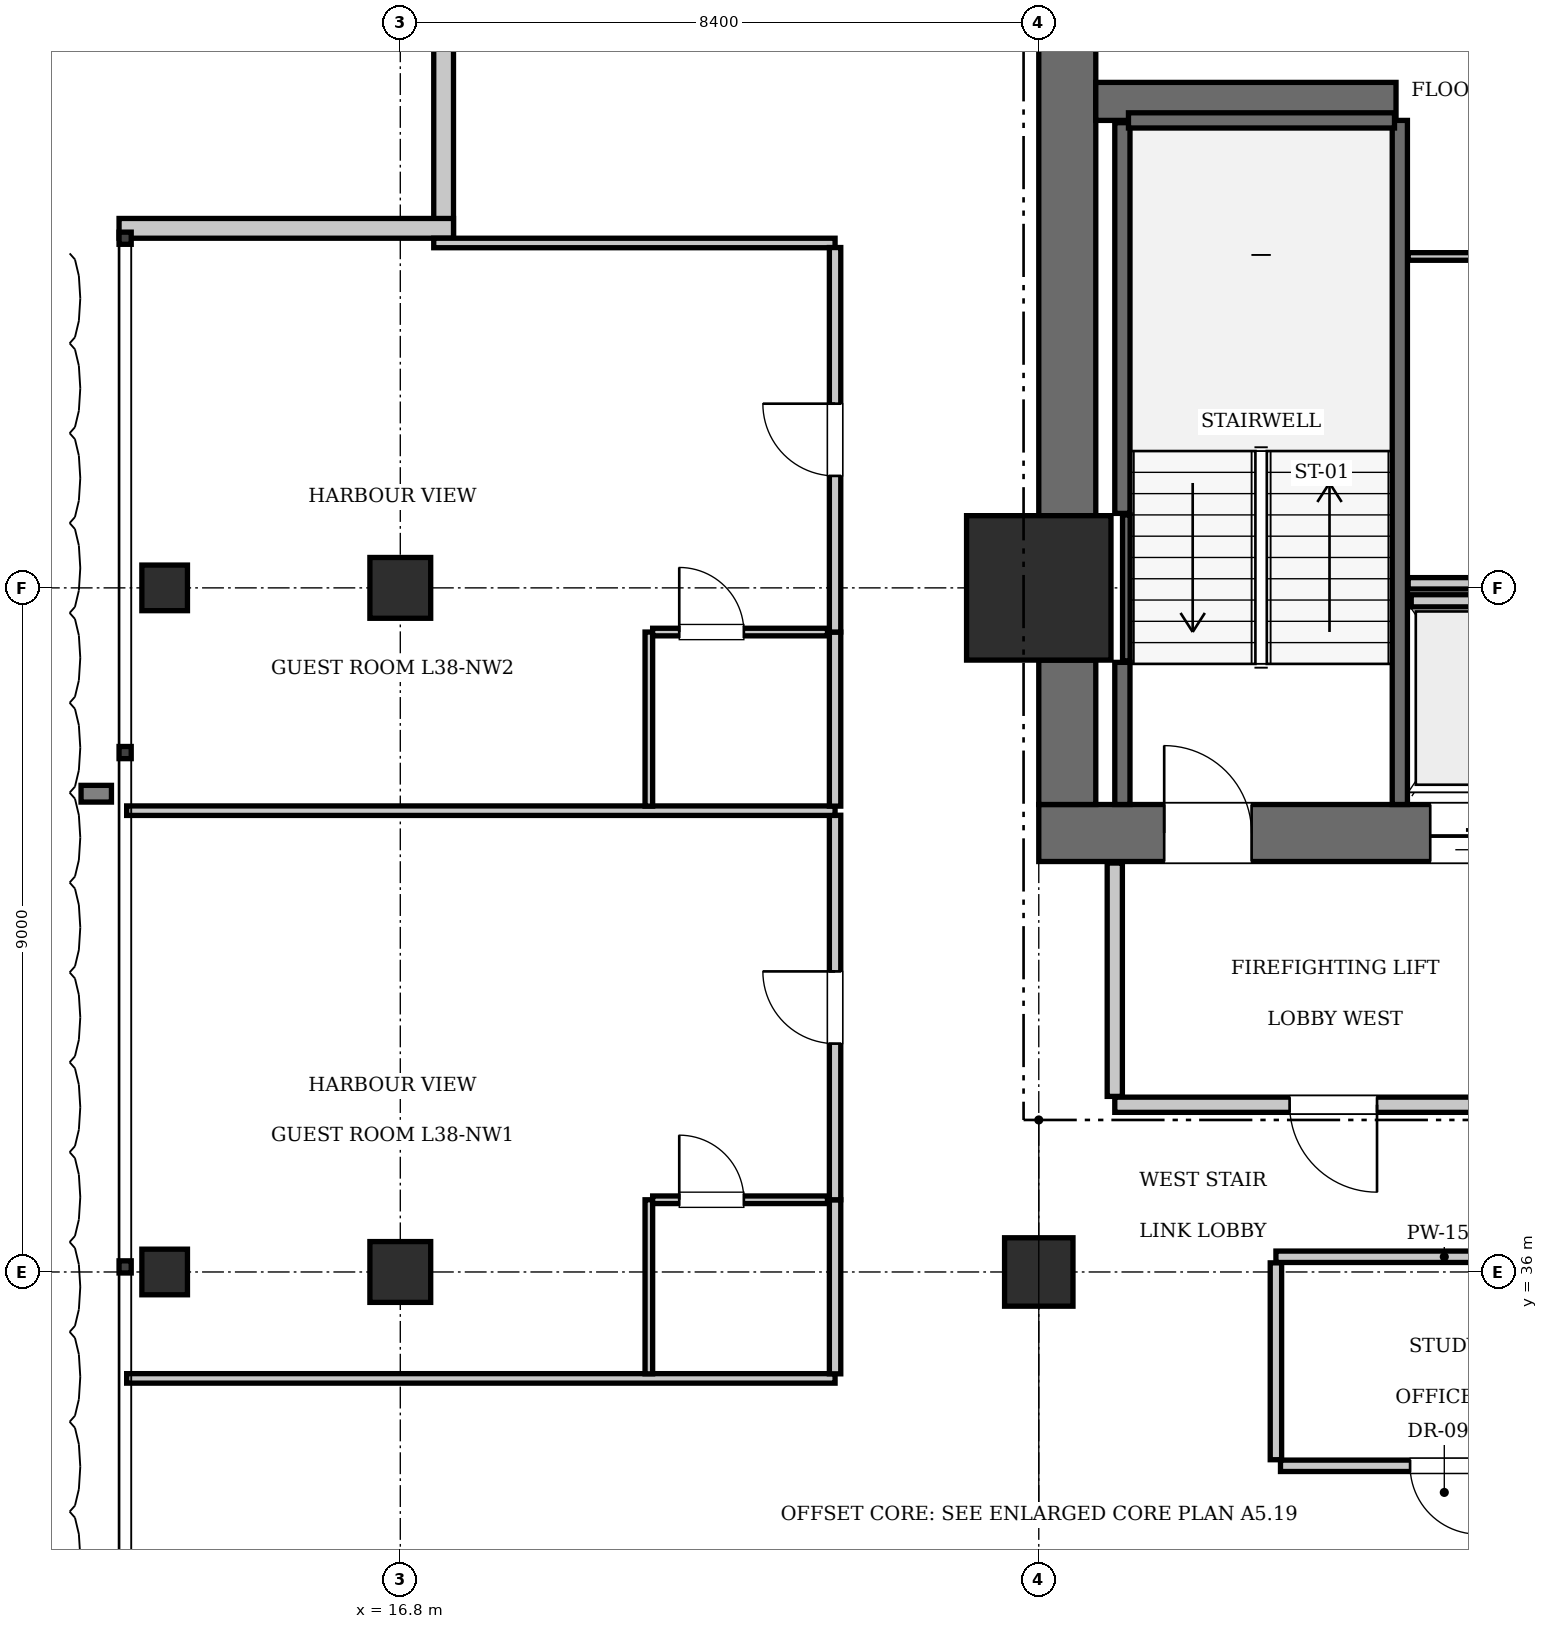
"""IFC4 building model, lengths in metres.
Left out: names, types, materials, properties, quantities, classifications, styles, units other than length and angle.
Written with IfcOpenShell. Run it as: python <this file> out.ifc"""

import sys

from ifc_helpers import new_model, si_unit, direction, frame, frame_2d, origin, origin_2d, place, context, subcontext, project, spatial, rectangle, i_section, extrude, element, fill, save


model = new_model("IFC4")
c1 = context("Model", 3, precision=1e-05, world=origin(), true_north=direction((0.0, 1.0)))
c2 = subcontext(c1, "Body", "Model", "MODEL_VIEW")
j1 = project(units=[si_unit("LENGTHUNIT", "METRE"), si_unit("PLANEANGLEUNIT", "RADIAN")], contexts=[c1])
p1 = place(None, origin())
s1 = spatial("IfcSite", under=j1, at=p1, CompositionType="ELEMENT")
p2 = place(p1, origin())
s2 = spatial("IfcBuilding", under=s1, at=p2, CompositionType="ELEMENT")
p3 = place(p2, frame((0.0, 0.0, 158.2)))
s3 = spatial("IfcBuildingStorey", under=s2, at=p3, CompositionType="ELEMENT", Elevation=158.2)
p4 = place(p3, frame((25.2, 45.0, 0.0), z_axis=(0.0, 0.0, 1.0), x_axis=(1.0, 0.0, 0.0)))
e1 = element("IfcColumn", 1, at=p4, inside=s3, PredefinedType="COLUMN", context=c2, shape_type="SweptSolid", body=[
    extrude(rectangle(XDim=1.9, YDim=1.9, at=origin_2d()), origin(), (0.0, 0.0, 1.0), 3.85),
])
p5 = place(p3, frame((25.2, 41.775, 0.0), z_axis=(0.0, 0.0, 1.0), x_axis=(1.0, 0.0, 0.0)))
e2 = element("IfcWall", 2, at=p5, inside=s3, PredefinedType="SHEAR", context=c2, shape_type="SweptSolid", body=[
    extrude(rectangle(XDim=6.8, YDim=0.75, at=frame_2d((3.4, 0.0))), origin(), (0.0, 0.0, 1.0), 3.85),
])
p6 = place(p5, frame((1.65, 0.0, 0.0)))
e3 = element("IfcOpeningElement", 3, at=p6, cuts=e2, PredefinedType="OPENING", context=c2, shape_type="SweptSolid", body=[
    extrude(rectangle(XDim=1.15, YDim=2.15, at=frame_2d((0.575, 1.075))), frame((0.0, 0.385, 0.0), z_axis=(0.0, -1.0, 0.0), x_axis=(1.0, 0.0, 0.0)), (0.0, 0.0, 1.0), 0.77),
])
p7 = place(p5, frame((5.15, 0.0, 0.0)))
e4 = element("IfcOpeningElement", 4, at=p7, cuts=e2, PredefinedType="OPENING", context=c2, shape_type="SweptSolid", body=[
    extrude(rectangle(XDim=1.1, YDim=2.2, at=frame_2d((0.55, 1.1))), frame((0.0, 0.385, 0.0), z_axis=(0.0, -1.0, 0.0), x_axis=(1.0, 0.0, 0.0)), (0.0, 0.0, 1.0), 0.77),
])
p8 = place(p3, frame((25.575, 42.15, 0.0), z_axis=(0.0, 0.0, 1.0), x_axis=(0.0, 1.0, 0.0)))
e5 = element("IfcWall", 5, at=p8, inside=s3, PredefinedType="SHEAR", context=c2, shape_type="SweptSolid", body=[
    extrude(rectangle(XDim=1.9, YDim=0.75, at=frame_2d((0.95, 0.0))), origin(), (0.0, 0.0, 1.0), 3.85),
])
p9 = place(p3, frame((25.575, 45.95, 0.0), z_axis=(0.0, 0.0, 1.0), x_axis=(0.0, 1.0, 0.0)))
e6 = element("IfcWall", 6, at=p9, inside=s3, PredefinedType="SHEAR", context=c2, shape_type="SweptSolid", body=[
    extrude(rectangle(XDim=7.3, YDim=0.75, at=frame_2d((3.65, 0.0))), origin(), (0.0, 0.0, 1.0), 3.85),
])
p10 = place(p3, frame((25.95, 51.4, 0.0), z_axis=(0.0, 0.0, 1.0), x_axis=(1.0, 0.0, 0.0)))
e7 = element("IfcWall", 7, at=p10, inside=s3, PredefinedType="SHEAR", context=c2, shape_type="SweptSolid", body=[
    extrude(rectangle(XDim=3.95, YDim=0.5, at=frame_2d((1.975, 0.0))), origin(), (0.0, 0.0, 1.0), 3.85),
])
p11 = place(p3, frame((25.2, 36.0, 0.0), z_axis=(0.0, 0.0, 1.0), x_axis=(1.0, 0.0, 0.0)))
e8 = element("IfcColumn", 8, at=p11, inside=s3, PredefinedType="COLUMN", context=c2, shape_type="SweptSolid", body=[
    extrude(rectangle(XDim=0.9, YDim=0.9, at=origin_2d()), origin(), (0.0, 0.0, 1.0), 3.85),
])
for number, where, z_axis, x_axis in (
    (9, (16.8, 36.0, 0.0), (0.0, 0.0, 1.0), (1.0, 0.0, 0.0)),
    (10, (16.8, 45.0, 0.0), (0.0, 0.0, 1.0), (1.0, 0.0, 0.0)),
):
    element("IfcColumn", number, at=place(p3, frame(where, z_axis=z_axis, x_axis=x_axis)), inside=s3, PredefinedType="COLUMN", context=c2, shape_type="SweptSolid", body=[
        extrude(rectangle(XDim=0.8, YDim=0.8, at=origin_2d()), origin(), (0.0, 0.0, 1.0), 3.85),
    ])
for number, where, z_axis, x_axis in (
    (11, (13.7, 36.0, 0.0), (0.0, 0.0, 1.0), (1.0, 0.0, 0.0)),
    (12, (13.7, 45.0, 0.0), (0.0, 0.0, 1.0), (1.0, 0.0, 0.0)),
):
    element("IfcColumn", number, at=place(p3, frame(where, z_axis=z_axis, x_axis=x_axis)), inside=s3, PredefinedType="COLUMN", context=c2, shape_type="SweptSolid", body=[
        extrude(i_section(OverallWidth=0.6, OverallDepth=0.6, WebThickness=0.025, FlangeThickness=0.038, at=origin_2d()), origin(), (0.0, 0.0, 1.0), 3.85),
    ])
p12 = place(p3, frame((29.95, 42.15, 0.0), z_axis=(0.0, 0.0, 1.0), x_axis=(0.0, 1.0, 0.0)))
e13 = element("IfcWall", 13, at=p12, inside=s3, PredefinedType="SOLIDWALL", context=c2, shape_type="SweptSolid", body=[
    extrude(rectangle(XDim=9.0, YDim=0.2, at=frame_2d((4.5, 0.0))), origin(), (0.0, 0.0, 1.0), 3.61),
])
p13 = place(p3, frame((26.3, 42.15, 0.0), z_axis=(0.0, 0.0, 1.0), x_axis=(0.0, 1.0, 0.0)))
e14 = element("IfcWall", 14, at=p13, inside=s3, PredefinedType="SOLIDWALL", context=c2, shape_type="SweptSolid", body=[
    extrude(rectangle(XDim=1.87, YDim=0.2, at=frame_2d((0.935, 0.0))), origin(), (0.0, 0.0, 1.0), 3.61),
])
p14 = place(p3, frame((26.3, 45.98, 0.0), z_axis=(0.0, 0.0, 1.0), x_axis=(0.0, 1.0, 0.0)))
e15 = element("IfcWall", 15, at=p14, inside=s3, PredefinedType="SOLIDWALL", context=c2, shape_type="SweptSolid", body=[
    extrude(rectangle(XDim=5.14, YDim=0.2, at=frame_2d((2.57, 0.0))), origin(), (0.0, 0.0, 1.0), 3.61),
])
p15 = place(p3, frame((26.38, 51.15, 0.0), z_axis=(0.0, 0.0, 1.0), x_axis=(1.0, 0.0, 0.0)))
e16 = element("IfcWall", 16, at=p15, inside=s3, PredefinedType="SOLIDWALL", context=c2, shape_type="SweptSolid", body=[
    extrude(rectangle(XDim=3.5, YDim=0.2, at=frame_2d((1.75, 0.0))), origin(), (0.0, 0.0, 1.0), 3.61),
])
p16 = place(p3, frame((26.352, 44.04, 0.0), z_axis=(0.0, 0.0, 1.0), x_axis=(0.0, 1.0, 0.0)))
e17 = element("IfcWall", 17, at=p16, inside=s3, PredefinedType="SOLIDWALL", context=c2, shape_type="SweptSolid", body=[
    extrude(rectangle(XDim=1.92, YDim=0.1, at=frame_2d((0.96, 0.0))), origin(), (0.0, 0.0, 1.0), 3.61),
])
p17 = place(p3, frame((30.1, 44.83, 0.0), z_axis=(0.0, 0.0, 1.0), x_axis=(1.0, 0.0, 0.0)))
e18 = element("IfcWall", 18, at=p17, inside=s3, PredefinedType="SOLIDWALL", context=c2, shape_type="SweptSolid", body=[
    extrude(rectangle(XDim=1.6, YDim=0.16, at=frame_2d((0.8, 0.0))), origin(), (0.0, 0.0, 1.0), 3.61),
])
for number, where, z_axis, x_axis in (
    (19, (17.37, 49.6, 0.0), (0.0, 0.0, 1.0), (0.0, 1.0, 0.0)),
    (20, (13.1, 49.73, 0.0), (0.0, 0.0, 1.0), (1.0, 0.0, 0.0)),
):
    element("IfcWall", number, at=place(p3, frame(where, z_axis=z_axis, x_axis=x_axis)), inside=s3, PredefinedType="SOLIDWALL", context=c2, shape_type="SweptSolid", body=[
        extrude(rectangle(XDim=4.4, YDim=0.26, at=frame_2d((2.2, 0.0))), origin(), (0.0, 0.0, 1.0), 3.61),
    ])
p18 = place(p3, frame((26.2, 38.2, 0.0), z_axis=(0.0, 0.0, 1.0), x_axis=(1.0, 0.0, 0.0)))
e21 = element("IfcWall", 21, at=p18, inside=s3, PredefinedType="PARTITIONING", context=c2, shape_type="SweptSolid", body=[
    extrude(rectangle(XDim=5.8, YDim=0.2, at=frame_2d((2.9, 0.0))), origin(), (0.0, 0.0, 1.0), 3.61),
])
p19 = place(p18, frame((2.3, 0.0, 0.0)))
e22 = element("IfcOpeningElement", 22, at=p19, cuts=e21, PredefinedType="OPENING", context=c2, shape_type="SweptSolid", body=[
    extrude(rectangle(XDim=1.15, YDim=2.15, at=frame_2d((0.575, 1.075))), frame((0.0, 0.11, 0.0), z_axis=(0.0, -1.0, 0.0), x_axis=(1.0, 0.0, 0.0)), (0.0, 0.0, 1.0), 0.22),
])
p20 = place(p3, frame((26.2, 38.31, 0.0), z_axis=(0.0, 0.0, 1.0), x_axis=(0.0, 1.0, 0.0)))
e23 = element("IfcWall", 23, at=p20, inside=s3, PredefinedType="PARTITIONING", context=c2, shape_type="SweptSolid", body=[
    extrude(rectangle(XDim=3.07, YDim=0.2, at=frame_2d((1.535, 0.0))), origin(), (0.0, 0.0, 1.0), 3.61),
])
p21 = place(p3, frame((30.06, 45.06, 0.0), z_axis=(0.0, 0.0, 1.0), x_axis=(1.0, 0.0, 0.0)))
e24 = element("IfcWall", 24, at=p21, inside=s3, PredefinedType="PARTITIONING", context=c2, shape_type="SweptSolid", body=[
    extrude(rectangle(XDim=3.18, YDim=0.15, at=frame_2d((1.59, 0.0))), origin(), (0.0, 0.0, 1.0), 3.61),
])
p22 = place(p3, frame((30.06, 49.36, 0.0), z_axis=(0.0, 0.0, 1.0), x_axis=(1.0, 0.0, 0.0)))
e25 = element("IfcWall", 25, at=p22, inside=s3, PredefinedType="PARTITIONING", context=c2, shape_type="SweptSolid", body=[
    extrude(rectangle(XDim=3.18, YDim=0.1, at=frame_2d((1.59, 0.0))), origin(), (0.0, 0.0, 1.0), 3.61),
])
p23 = place(p22, frame((1.95, 0.0, 0.0)))
e26 = element("IfcOpeningElement", 26, at=p23, cuts=e25, PredefinedType="OPENING", context=c2, shape_type="SweptSolid", body=[
    extrude(rectangle(XDim=0.8, YDim=2.05, at=frame_2d((0.4, 1.025))), frame((0.0, 0.06, 0.0), z_axis=(0.0, -1.0, 0.0), x_axis=(1.0, 0.0, 0.0)), (0.0, 0.0, 1.0), 0.12),
])
p24 = place(p3, frame((28.32, 36.2, 0.0), z_axis=(0.0, 0.0, 1.0), x_axis=(1.0, 0.0, 0.0)))
e27 = element("IfcWall", 27, at=p24, inside=s3, PredefinedType="PARTITIONING", context=c2, shape_type="SweptSolid", body=[
    extrude(rectangle(XDim=4.43, YDim=0.15, at=frame_2d((2.215, 0.0))), origin(), (0.0, 0.0, 1.0), 3.61),
])
p25 = place(p3, frame((28.32, 33.53, 0.0), z_axis=(0.0, 0.0, 1.0), x_axis=(0.0, 1.0, 0.0)))
e28 = element("IfcWall", 28, at=p25, inside=s3, PredefinedType="PARTITIONING", context=c2, shape_type="SweptSolid", body=[
    extrude(rectangle(XDim=2.59, YDim=0.15, at=frame_2d((1.295, 0.0))), origin(), (0.0, 0.0, 1.0), 3.61),
])
p26 = place(p3, frame((28.38, 33.45, 0.0), z_axis=(0.0, 0.0, 1.0), x_axis=(1.0, 0.0, 0.0)))
e29 = element("IfcWall", 29, at=p26, inside=s3, PredefinedType="PARTITIONING", context=c2, shape_type="SweptSolid", body=[
    extrude(rectangle(XDim=4.31, YDim=0.15, at=frame_2d((2.155, 0.0))), origin(), (0.0, 0.0, 1.0), 3.61),
])
p27 = place(p26, frame((1.705, 0.0, 0.0)))
e30 = element("IfcOpeningElement", 30, at=p27, cuts=e29, PredefinedType="OPENING", context=c2, shape_type="SweptSolid", body=[
    extrude(rectangle(XDim=0.9, YDim=2.1, at=frame_2d((0.45, 1.05))), frame((0.0, 0.085, 0.0), z_axis=(0.0, -1.0, 0.0), x_axis=(1.0, 0.0, 0.0)), (0.0, 0.0, 1.0), 0.17),
])
p28 = place(p3, frame((13.2, 34.6, 0.0), z_axis=(0.0, 0.0, 1.0), x_axis=(1.0, 0.0, 0.0)))
e31 = element("IfcWall", 31, at=p28, inside=s3, PredefinedType="PARTITIONING", context=c2, shape_type="SweptSolid", body=[
    extrude(rectangle(XDim=9.32, YDim=0.125, at=frame_2d((4.66, 0.0))), origin(), (0.0, 0.0, 1.0), 3.61),
])
p29 = place(p3, frame((17.24, 49.538, 0.0), z_axis=(0.0, 0.0, 1.0), x_axis=(1.0, 0.0, 0.0)))
e32 = element("IfcWall", 32, at=p29, inside=s3, PredefinedType="PARTITIONING", context=c2, shape_type="SweptSolid", body=[
    extrude(rectangle(XDim=5.28, YDim=0.125, at=frame_2d((2.64, 0.0))), origin(), (0.0, 0.0, 1.0), 3.61),
])
p30 = place(p3, frame((22.52, 34.66, 0.0), z_axis=(0.0, 0.0, 1.0), x_axis=(0.0, 1.0, 0.0)))
e33 = element("IfcWall", 33, at=p30, inside=s3, PredefinedType="PARTITIONING", context=c2, shape_type="SweptSolid", body=[
    extrude(rectangle(XDim=2.29, YDim=0.15, at=frame_2d((1.145, 0.0))), origin(), (0.0, 0.0, 1.0), 3.61),
])
p31 = place(p3, frame((22.52, 36.95, 0.0), z_axis=(0.0, 0.0, 1.0), x_axis=(0.0, 1.0, 0.0)))
e34 = element("IfcWall", 34, at=p31, inside=s3, PredefinedType="PARTITIONING", context=c2, shape_type="SweptSolid", body=[
    extrude(rectangle(XDim=5.059, YDim=0.15, at=frame_2d((2.529, 0.0))), origin(), (0.0, 0.0, 1.0), 3.61),
])
p32 = place(p31, frame((2.054, 0.0, 0.0)))
e35 = element("IfcOpeningElement", 35, at=p32, cuts=e34, PredefinedType="OPENING", context=c2, shape_type="SweptSolid", body=[
    extrude(rectangle(XDim=0.95, YDim=2.15, at=frame_2d((0.475, 1.075))), frame((0.0, 0.085, 0.0), z_axis=(0.0, -1.0, 0.0), x_axis=(1.0, 0.0, 0.0)), (0.0, 0.0, 1.0), 0.17),
])
p33 = place(p3, frame((20.07, 34.66, 0.0), z_axis=(0.0, 0.0, 1.0), x_axis=(0.0, 1.0, 0.0)))
e36 = element("IfcWall", 36, at=p33, inside=s3, PredefinedType="PARTITIONING", context=c2, shape_type="SweptSolid", body=[
    extrude(rectangle(XDim=2.29, YDim=0.1, at=frame_2d((1.145, 0.0))), origin(), (0.0, 0.0, 1.0), 3.61),
])
p34 = place(p3, frame((20.12, 36.95, 0.0), z_axis=(0.0, 0.0, 1.0), x_axis=(1.0, 0.0, 0.0)))
e37 = element("IfcWall", 37, at=p34, inside=s3, PredefinedType="PARTITIONING", context=c2, shape_type="SweptSolid", body=[
    extrude(rectangle(XDim=2.3, YDim=0.1, at=frame_2d((1.15, 0.0))), origin(), (0.0, 0.0, 1.0), 3.61),
])
p35 = place(p34, frame((0.35, 0.0, 0.0)))
e38 = element("IfcOpeningElement", 38, at=p35, cuts=e37, PredefinedType="OPENING", context=c2, shape_type="SweptSolid", body=[
    extrude(rectangle(XDim=0.85, YDim=2.1, at=frame_2d((0.425, 1.05))), frame((0.0, 0.06, 0.0), z_axis=(0.0, -1.0, 0.0), x_axis=(1.0, 0.0, 0.0)), (0.0, 0.0, 1.0), 0.12),
])
p36 = place(p3, frame((13.2, 42.069, 0.0), z_axis=(0.0, 0.0, 1.0), x_axis=(1.0, 0.0, 0.0)))
e39 = element("IfcWall", 39, at=p36, inside=s3, PredefinedType="PARTITIONING", context=c2, shape_type="SweptSolid", body=[
    extrude(rectangle(XDim=9.32, YDim=0.125, at=frame_2d((4.66, 0.0))), origin(), (0.0, 0.0, 1.0), 3.61),
])
p37 = place(p3, frame((22.52, 42.129, 0.0), z_axis=(0.0, 0.0, 1.0), x_axis=(0.0, 1.0, 0.0)))
e40 = element("IfcWall", 40, at=p37, inside=s3, PredefinedType="PARTITIONING", context=c2, shape_type="SweptSolid", body=[
    extrude(rectangle(XDim=2.29, YDim=0.15, at=frame_2d((1.145, 0.0))), origin(), (0.0, 0.0, 1.0), 3.61),
])
p38 = place(p3, frame((22.52, 44.419, 0.0), z_axis=(0.0, 0.0, 1.0), x_axis=(0.0, 1.0, 0.0)))
e41 = element("IfcWall", 41, at=p38, inside=s3, PredefinedType="PARTITIONING", context=c2, shape_type="SweptSolid", body=[
    extrude(rectangle(XDim=5.059, YDim=0.15, at=frame_2d((2.529, 0.0))), origin(), (0.0, 0.0, 1.0), 3.61),
])
p39 = place(p38, frame((2.054, 0.0, 0.0)))
e42 = element("IfcOpeningElement", 42, at=p39, cuts=e41, PredefinedType="OPENING", context=c2, shape_type="SweptSolid", body=[
    extrude(rectangle(XDim=0.95, YDim=2.15, at=frame_2d((0.475, 1.075))), frame((0.0, 0.085, 0.0), z_axis=(0.0, -1.0, 0.0), x_axis=(1.0, 0.0, 0.0)), (0.0, 0.0, 1.0), 0.17),
])
p40 = place(p3, frame((20.07, 42.129, 0.0), z_axis=(0.0, 0.0, 1.0), x_axis=(0.0, 1.0, 0.0)))
e43 = element("IfcWall", 43, at=p40, inside=s3, PredefinedType="PARTITIONING", context=c2, shape_type="SweptSolid", body=[
    extrude(rectangle(XDim=2.29, YDim=0.1, at=frame_2d((1.145, 0.0))), origin(), (0.0, 0.0, 1.0), 3.61),
])
p41 = place(p3, frame((20.12, 44.419, 0.0), z_axis=(0.0, 0.0, 1.0), x_axis=(1.0, 0.0, 0.0)))
e44 = element("IfcWall", 44, at=p41, inside=s3, PredefinedType="PARTITIONING", context=c2, shape_type="SweptSolid", body=[
    extrude(rectangle(XDim=2.3, YDim=0.1, at=frame_2d((1.15, 0.0))), origin(), (0.0, 0.0, 1.0), 3.61),
])
p42 = place(p41, frame((0.35, 0.0, 0.0)))
e45 = element("IfcOpeningElement", 45, at=p42, cuts=e44, PredefinedType="OPENING", context=c2, shape_type="SweptSolid", body=[
    extrude(rectangle(XDim=0.85, YDim=2.1, at=frame_2d((0.425, 1.05))), frame((0.0, 0.06, 0.0), z_axis=(0.0, -1.0, 0.0), x_axis=(1.0, 0.0, 0.0)), (0.0, 0.0, 1.0), 0.12),
])
p43 = place(p6, origin())
e46 = element("IfcDoor", 46, at=p43, inside=s3, OperationType="SINGLE_SWING_LEFT", PredefinedType="DOOR", context=c2, shape_type="SweptSolid", body=[
    extrude(rectangle(XDim=1.15, YDim=2.15, at=frame_2d((0.575, 1.075))), frame((0.0, 0.025, 0.0), z_axis=(0.0, -1.0, 0.0), x_axis=(1.0, 0.0, 0.0)), (0.0, 0.0, 1.0), 0.05),
])
fill(e3, e46)
p44 = place(p7, frame((1.1, 0.0, 0.0), z_axis=(0.0, 0.0, 1.0), x_axis=(-1.0, 0.0, 0.0)))
e47 = element("IfcDoor", 47, at=p44, inside=s3, OperationType="SLIDING_TO_LEFT", PredefinedType="DOOR", context=c2, shape_type="SweptSolid", body=[
    extrude(rectangle(XDim=1.1, YDim=2.2, at=frame_2d((0.55, 1.1))), frame((0.0, 0.025, 0.0), z_axis=(0.0, -1.0, 0.0), x_axis=(1.0, 0.0, 0.0)), (0.0, 0.0, 1.0), 0.05),
])
fill(e4, e47)
p45 = place(p19, frame((1.15, 0.0, 0.0), z_axis=(0.0, 0.0, 1.0), x_axis=(-1.0, 0.0, 0.0)))
e48 = element("IfcDoor", 48, at=p45, inside=s3, OperationType="SINGLE_SWING_LEFT", PredefinedType="DOOR", context=c2, shape_type="SweptSolid", body=[
    extrude(rectangle(XDim=1.15, YDim=2.15, at=frame_2d((0.575, 1.075))), frame((0.0, 0.025, 0.0), z_axis=(0.0, -1.0, 0.0), x_axis=(1.0, 0.0, 0.0)), (0.0, 0.0, 1.0), 0.05),
])
fill(e22, e48)
p46 = place(p27, frame((0.9, 0.0, 0.0), z_axis=(0.0, 0.0, 1.0), x_axis=(-1.0, 0.0, 0.0)))
e49 = element("IfcDoor", 49, at=p46, inside=s3, OperationType="SINGLE_SWING_LEFT", PredefinedType="DOOR", context=c2, shape_type="SweptSolid", body=[
    extrude(rectangle(XDim=0.9, YDim=2.1, at=frame_2d((0.45, 1.05))), frame((0.0, 0.025, 0.0), z_axis=(0.0, -1.0, 0.0), x_axis=(1.0, 0.0, 0.0)), (0.0, 0.0, 1.0), 0.05),
])
fill(e30, e49)
p47 = place(p35, origin())
e50 = element("IfcDoor", 50, at=p47, inside=s3, OperationType="SINGLE_SWING_LEFT", PredefinedType="DOOR", context=c2, shape_type="SweptSolid", body=[
    extrude(rectangle(XDim=0.85, YDim=2.1, at=frame_2d((0.425, 1.05))), frame((0.0, 0.025, 0.0), z_axis=(0.0, -1.0, 0.0), x_axis=(1.0, 0.0, 0.0)), (0.0, 0.0, 1.0), 0.05),
])
fill(e38, e50)
p48 = place(p32, origin())
e51 = element("IfcDoor", 51, at=p48, inside=s3, OperationType="SINGLE_SWING_RIGHT", PredefinedType="DOOR", context=c2, shape_type="SweptSolid", body=[
    extrude(rectangle(XDim=0.95, YDim=2.15, at=frame_2d((0.475, 1.075))), frame((0.0, 0.025, 0.0), z_axis=(0.0, -1.0, 0.0), x_axis=(1.0, 0.0, 0.0)), (0.0, 0.0, 1.0), 0.05),
])
fill(e35, e51)
p49 = place(p42, origin())
e52 = element("IfcDoor", 52, at=p49, inside=s3, OperationType="SINGLE_SWING_LEFT", PredefinedType="DOOR", context=c2, shape_type="SweptSolid", body=[
    extrude(rectangle(XDim=0.85, YDim=2.1, at=frame_2d((0.425, 1.05))), frame((0.0, 0.025, 0.0), z_axis=(0.0, -1.0, 0.0), x_axis=(1.0, 0.0, 0.0)), (0.0, 0.0, 1.0), 0.05),
])
fill(e45, e52)
p50 = place(p39, origin())
e53 = element("IfcDoor", 53, at=p50, inside=s3, OperationType="SINGLE_SWING_RIGHT", PredefinedType="DOOR", context=c2, shape_type="SweptSolid", body=[
    extrude(rectangle(XDim=0.95, YDim=2.15, at=frame_2d((0.475, 1.075))), frame((0.0, 0.025, 0.0), z_axis=(0.0, -1.0, 0.0), x_axis=(1.0, 0.0, 0.0)), (0.0, 0.0, 1.0), 0.05),
])
fill(e42, e53)
save(model, sys.argv[1])
